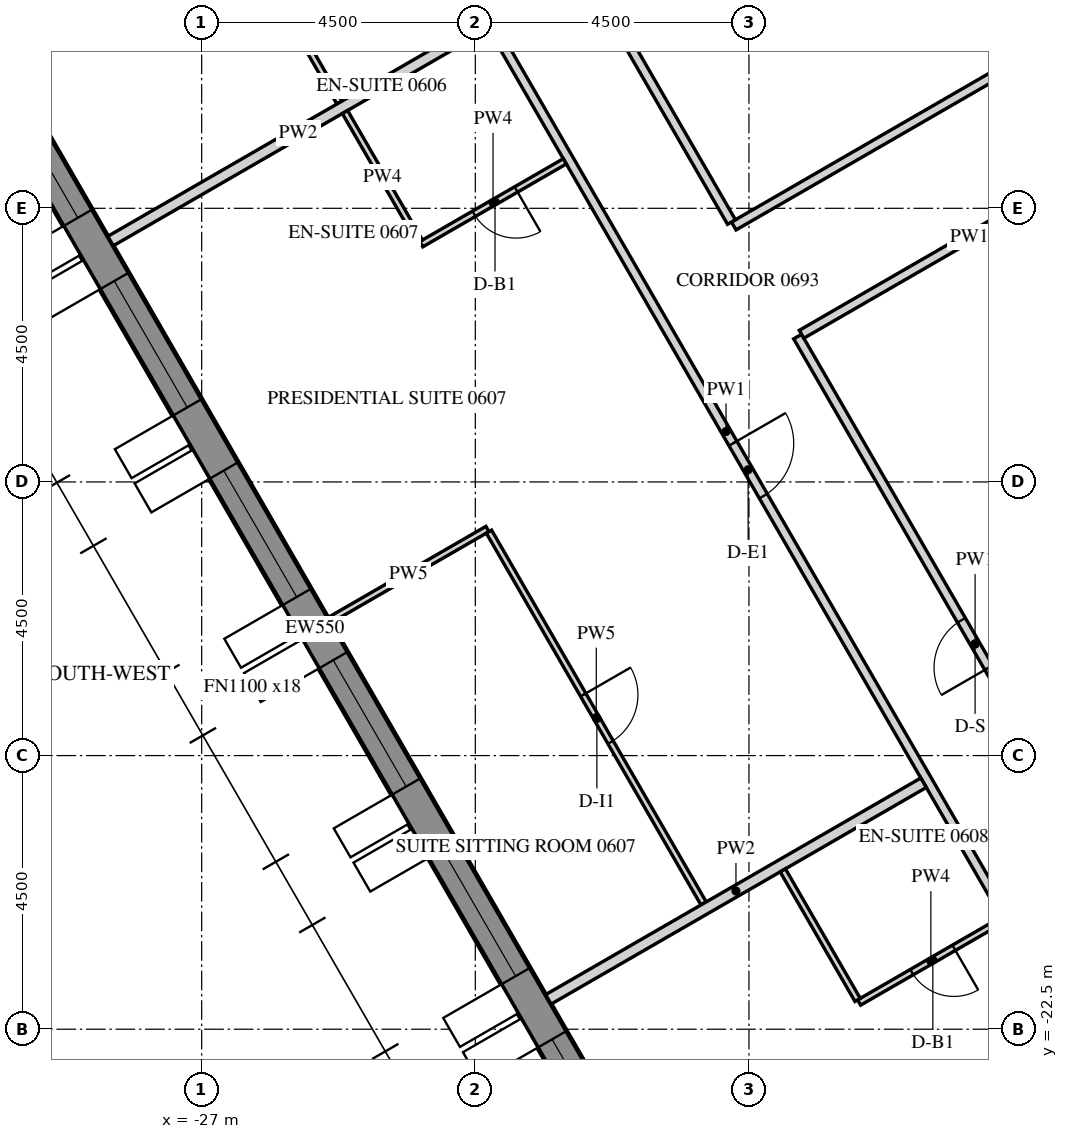
"""IFC4 building model, lengths in metres.
Left out: names, types, materials, properties, quantities, classifications, styles, units other than length and angle.
Written with IfcOpenShell. Run it as: python <this file> out.ifc"""

import sys

from ifc_helpers import new_model, si_unit, direction, frame, frame_2d, origin, place, context, subcontext, project, spatial, polyline, rectangle, outline, extrude, element, fill, save


model = new_model("IFC4")
c1 = context("Model", 3, precision=1e-05, world=origin(), true_north=direction((0.0, 1.0)))
c2 = subcontext(c1, "Body", "Model", "MODEL_VIEW")
j1 = project(units=[si_unit("LENGTHUNIT", "METRE"), si_unit("PLANEANGLEUNIT", "RADIAN")], contexts=[c1])
p1 = place(None, origin())
s1 = spatial("IfcSite", under=j1, at=p1, CompositionType="ELEMENT")
p2 = place(p1, origin())
s2 = spatial("IfcBuilding", under=s1, at=p2, CompositionType="ELEMENT")
p3 = place(p2, frame((0.0, 0.0, 92.1)))
s3 = spatial("IfcBuildingStorey", under=s2, at=p3, CompositionType="ELEMENT", Elevation=92.1)
p4 = place(p3, frame((-32.655, -2.89, -0.15), z_axis=(0.0, 0.0, 1.0), x_axis=(0.499997711317, -0.866026725152, 0.0)))
e1 = element("IfcWall", 1, at=p4, inside=s3, PredefinedType="SOLIDWALL", context=c2, shape_type="SweptSolid", body=[
    extrude(outline(polyline([(-0.022, -0.275), (30.097, -0.275), (30.045, 0.275), (0.022, 0.275), (-0.022, -0.275)])), origin(), (0.0, 0.0, 1.0), 3.9),
])
p5 = place(p4, frame((1.236, 0.0, 1.05)))
e2 = element("IfcOpeningElement", 2, at=p5, cuts=e1, PredefinedType="OPENING", context=c2, shape_type="SweptSolid", body=[
    extrude(rectangle(XDim=2.4, YDim=2.4, at=frame_2d((1.2, 1.2))), frame((0.0, 0.285, 0.0), z_axis=(0.0, -1.0, 0.0), x_axis=(1.0, 0.0, 0.0)), (0.0, 0.0, 1.0), 0.57),
])
p6 = place(p4, frame((4.835, 0.0, 1.05)))
e3 = element("IfcOpeningElement", 3, at=p6, cuts=e1, PredefinedType="OPENING", context=c2, shape_type="SweptSolid", body=[
    extrude(rectangle(XDim=2.4, YDim=2.4, at=frame_2d((1.2, 1.2))), frame((0.0, 0.285, 0.0), z_axis=(0.0, -1.0, 0.0), x_axis=(1.0, 0.0, 0.0)), (0.0, 0.0, 1.0), 0.57),
])
p7 = place(p4, frame((8.436, 0.0, 1.05)))
e4 = element("IfcOpeningElement", 4, at=p7, cuts=e1, PredefinedType="OPENING", context=c2, shape_type="SweptSolid", body=[
    extrude(rectangle(XDim=2.4, YDim=2.4, at=frame_2d((1.2, 1.2))), frame((0.0, 0.285, 0.0), z_axis=(0.0, -1.0, 0.0), x_axis=(1.0, 0.0, 0.0)), (0.0, 0.0, 1.0), 0.57),
])
p8 = place(p4, frame((12.035, 0.0, 1.05)))
e5 = element("IfcOpeningElement", 5, at=p8, cuts=e1, PredefinedType="OPENING", context=c2, shape_type="SweptSolid", body=[
    extrude(rectangle(XDim=2.4, YDim=2.4, at=frame_2d((1.2, 1.2))), frame((0.0, 0.285, 0.0), z_axis=(0.0, -1.0, 0.0), x_axis=(1.0, 0.0, 0.0)), (0.0, 0.0, 1.0), 0.57),
])
p9 = place(p4, frame((15.635, 0.0, 1.05)))
e6 = element("IfcOpeningElement", 6, at=p9, cuts=e1, PredefinedType="OPENING", context=c2, shape_type="SweptSolid", body=[
    extrude(rectangle(XDim=2.4, YDim=2.4, at=frame_2d((1.2, 1.2))), frame((0.0, 0.285, 0.0), z_axis=(0.0, -1.0, 0.0), x_axis=(1.0, 0.0, 0.0)), (0.0, 0.0, 1.0), 0.57),
])
p10 = place(p4, frame((19.236, 0.0, 1.05)))
e7 = element("IfcOpeningElement", 7, at=p10, cuts=e1, PredefinedType="OPENING", context=c2, shape_type="SweptSolid", body=[
    extrude(rectangle(XDim=2.4, YDim=2.4, at=frame_2d((1.2, 1.2))), frame((0.0, 0.285, 0.0), z_axis=(0.0, -1.0, 0.0), x_axis=(1.0, 0.0, 0.0)), (0.0, 0.0, 1.0), 0.57),
])
p11 = place(p4, frame((22.835, 0.0, 1.05)))
e8 = element("IfcOpeningElement", 8, at=p11, cuts=e1, PredefinedType="OPENING", context=c2, shape_type="SweptSolid", body=[
    extrude(rectangle(XDim=2.4, YDim=2.4, at=frame_2d((1.2, 1.2))), frame((0.0, 0.285, 0.0), z_axis=(0.0, -1.0, 0.0), x_axis=(1.0, 0.0, 0.0)), (0.0, 0.0, 1.0), 0.57),
])
p12 = place(p4, frame((26.436, 0.0, 1.05)))
e9 = element("IfcOpeningElement", 9, at=p12, cuts=e1, PredefinedType="OPENING", context=c2, shape_type="SweptSolid", body=[
    extrude(rectangle(XDim=2.4, YDim=2.4, at=frame_2d((1.2, 1.2))), frame((0.0, 0.285, 0.0), z_axis=(0.0, -1.0, 0.0), x_axis=(1.0, 0.0, 0.0)), (0.0, 0.0, 1.0), 0.57),
])
p13 = place(p3, frame((-15.819, 0.0, -0.15), z_axis=(0.0, 0.0, 1.0), x_axis=(0.499999880136, -0.866025472988, 0.0)))
e10 = element("IfcWall", 10, at=p13, inside=s3, PredefinedType="SHEAR", context=c2, shape_type="SweptSolid", body=[
    extrude(outline(polyline([(-0.173, -0.3), (15.993, -0.3), (15.646, 0.3), (0.173, 0.3), (-0.173, -0.3)])), origin(), (0.0, 0.0, 1.0), 3.9),
])
p14 = place(p13, frame((6.981, 0.0, 0.15)))
e11 = element("IfcOpeningElement", 11, at=p14, cuts=e10, PredefinedType="OPENING", context=c2, shape_type="SweptSolid", body=[
    extrude(rectangle(XDim=1.8, YDim=2.4, at=frame_2d((0.9, 1.2))), frame((0.0, 0.31, 0.0), z_axis=(0.0, -1.0, 0.0), x_axis=(1.0, 0.0, 0.0)), (0.0, 0.0, 1.0), 0.62),
])
p15 = place(p3, frame((-24.436, -2.175, 0.0), z_axis=(0.0, 0.0, 1.0), x_axis=(0.499996816197, -0.866027241946, 0.0)))
e12 = element("IfcWall", 12, at=p15, inside=s3, PredefinedType="PARTITIONING", context=c2, shape_type="SweptSolid", body=[
    extrude(rectangle(XDim=24.238, YDim=0.15, at=frame_2d((12.119, 0.0))), origin(), (0.0, 0.0, 1.0), 2.988),
])
p16 = place(p15, frame((0.429, 0.0, 0.0)))
e13 = element("IfcOpeningElement", 13, at=p16, cuts=e12, PredefinedType="OPENING", context=c2, shape_type="SweptSolid", body=[
    extrude(rectangle(XDim=1.0, YDim=2.1, at=frame_2d((0.5, 1.05))), frame((0.0, 0.085, 0.0), z_axis=(0.0, -1.0, 0.0), x_axis=(1.0, 0.0, 0.0)), (0.0, 0.0, 1.0), 0.17),
])
p17 = place(p15, frame((12.346, 0.0, 0.0)))
e14 = element("IfcOpeningElement", 14, at=p17, cuts=e12, PredefinedType="OPENING", context=c2, shape_type="SweptSolid", body=[
    extrude(rectangle(XDim=1.0, YDim=2.1, at=frame_2d((0.5, 1.05))), frame((0.0, 0.085, 0.0), z_axis=(0.0, -1.0, 0.0), x_axis=(1.0, 0.0, 0.0)), (0.0, 0.0, 1.0), 0.17),
])
p18 = place(p15, frame((22.292, 0.0, 0.0)))
e15 = element("IfcOpeningElement", 15, at=p18, cuts=e12, PredefinedType="OPENING", context=c2, shape_type="SweptSolid", body=[
    extrude(rectangle(XDim=1.0, YDim=2.1, at=frame_2d((0.5, 1.05))), frame((0.0, 0.085, 0.0), z_axis=(0.0, -1.0, 0.0), x_axis=(1.0, 0.0, 0.0)), (0.0, 0.0, 1.0), 0.17),
])
p19 = place(p3, frame((-12.664, -6.066, 0.0), z_axis=(0.0, 0.0, 1.0), x_axis=(-0.866021702275, -0.500006411147, 0.0)))
e16 = element("IfcWall", 16, at=p19, inside=s3, PredefinedType="PARTITIONING", context=c2, shape_type="SweptSolid", body=[
    extrude(rectangle(XDim=6.45, YDim=0.15, at=frame_2d((3.225, 0.0))), origin(), (0.0, 0.0, 1.0), 2.988),
])
p20 = place(p3, frame((-18.287, -9.226, 0.0), z_axis=(0.0, 0.0, 1.0), x_axis=(-0.500004853958, 0.866022601332, 0.0)))
e17 = element("IfcWall", 17, at=p20, inside=s3, PredefinedType="PARTITIONING", context=c2, shape_type="SweptSolid", body=[
    extrude(rectangle(XDim=8.531, YDim=0.15, at=frame_2d((4.266, 0.0))), origin(), (0.0, 0.0, 1.0), 2.988),
])
p21 = place(p20, frame((3.816, 0.0, 0.0)))
e18 = element("IfcOpeningElement", 18, at=p21, cuts=e17, PredefinedType="OPENING", context=c2, shape_type="SweptSolid", body=[
    extrude(rectangle(XDim=0.9, YDim=2.1, at=frame_2d((0.45, 1.05))), frame((0.0, 0.085, 0.0), z_axis=(0.0, -1.0, 0.0), x_axis=(1.0, 0.0, 0.0)), (0.0, 0.0, 1.0), 0.17),
])
p22 = place(p3, frame((-11.363, -21.219, 0.0), z_axis=(0.0, 0.0, 1.0), x_axis=(-0.50001451402, 0.866017023949, 0.0)))
e19 = element("IfcWall", 19, at=p22, inside=s3, PredefinedType="PARTITIONING", context=c2, shape_type="SweptSolid", body=[
    extrude(rectangle(XDim=11.674, YDim=0.15, at=frame_2d((5.837, 0.0))), origin(), (0.0, 0.0, 1.0), 2.988),
])
p23 = place(p22, frame((5.387, 0.0, 0.0)))
e20 = element("IfcOpeningElement", 20, at=p23, cuts=e19, PredefinedType="OPENING", context=c2, shape_type="SweptSolid", body=[
    extrude(rectangle(XDim=0.9, YDim=2.1, at=frame_2d((0.45, 1.05))), frame((0.0, 0.085, 0.0), z_axis=(0.0, -1.0, 0.0), x_axis=(1.0, 0.0, 0.0)), (0.0, 0.0, 1.0), 0.17),
])
p24 = place(p3, frame((-17.135, -11.072, 0.0), z_axis=(0.0, 0.0, 1.0), x_axis=(0.866028703517, 0.499994284652, 0.0)))
e21 = element("IfcWall", 21, at=p24, inside=s3, PredefinedType="PARTITIONING", context=c2, shape_type="SweptSolid", body=[
    extrude(rectangle(XDim=6.375, YDim=0.15, at=frame_2d((3.188, 0.0))), origin(), (0.0, 0.0, 1.0), 2.988),
])
p25 = place(p3, frame((-24.733, -7.26, 0.0), z_axis=(0.0, 0.0, 1.0), x_axis=(-0.500015210774, 0.866016621662, 0.0)))
e22 = element("IfcWall", 22, at=p25, inside=s3, PredefinedType="PARTITIONING", context=c2, shape_type="SweptSolid", body=[
    extrude(rectangle(XDim=2.31, YDim=0.1, at=frame_2d((1.155, 0.0))), origin(), (0.0, 0.0, 1.0), 2.988),
])
p26 = place(p3, frame((-28.499, -9.538, 0.0), z_axis=(0.0, 0.0, 1.0), x_axis=(0.866024672353, 0.500001266874, 0.0)))
e23 = element("IfcWall", 23, at=p26, inside=s3, PredefinedType="PARTITIONING", context=c2, shape_type="SweptSolid", body=[
    extrude(rectangle(XDim=7.125, YDim=0.18, at=frame_2d((3.562, 0.0))), origin(), (0.0, 0.0, 1.0), 2.988),
])
p27 = place(p3, frame((-21.029, -8.228, 0.0), z_axis=(0.0, 0.0, 1.0), x_axis=(-0.866012511928, -0.500022328685, 0.0)))
e24 = element("IfcWall", 24, at=p27, inside=s3, PredefinedType="PARTITIONING", context=c2, shape_type="SweptSolid", body=[
    extrude(rectangle(XDim=2.725, YDim=0.1, at=frame_2d((1.363, 0.0))), origin(), (0.0, 0.0, 1.0), 2.988),
])
p28 = place(p27, frame((0.925, 0.0, 0.0)))
e25 = element("IfcOpeningElement", 25, at=p28, cuts=e24, PredefinedType="OPENING", context=c2, shape_type="SweptSolid", body=[
    extrude(rectangle(XDim=0.8, YDim=2.1, at=frame_2d((0.4, 1.05))), frame((0.0, 0.06, 0.0), z_axis=(0.0, -1.0, 0.0), x_axis=(1.0, 0.0, 0.0)), (0.0, 0.0, 1.0), 0.12),
])
p29 = place(p3, frame((-23.413, -9.547, 0.0), z_axis=(0.0, 0.0, 1.0), x_axis=(-0.499960120811, 0.86604842682, 0.0)))
e26 = element("IfcWall", 26, at=p29, inside=s3, PredefinedType="PARTITIONING", context=c2, shape_type="SweptSolid", body=[
    extrude(rectangle(XDim=2.46, YDim=0.1, at=frame_2d((1.23, 0.0))), origin(), (0.0, 0.0, 1.0), 2.988),
])
p30 = place(p3, frame((-24.899, -15.774, 0.0), z_axis=(0.0, 0.0, 1.0), x_axis=(0.866066333729, 0.499929100554, 0.0)))
e27 = element("IfcWall", 27, at=p30, inside=s3, PredefinedType="PARTITIONING", context=c2, shape_type="SweptSolid", body=[
    extrude(rectangle(XDim=3.0, YDim=0.1, at=frame_2d((1.5, 0.0))), origin(), (0.0, 0.0, 1.0), 2.988),
])
p31 = place(p3, frame((-22.276, -14.317, 0.0), z_axis=(0.0, 0.0, 1.0), x_axis=(0.500010820671, -0.866019156377, 0.0)))
e28 = element("IfcWall", 28, at=p31, inside=s3, PredefinedType="PARTITIONING", context=c2, shape_type="SweptSolid", body=[
    extrude(rectangle(XDim=7.06, YDim=0.1, at=frame_2d((3.53, 0.0))), origin(), (0.0, 0.0, 1.0), 2.988),
])
p32 = place(p31, frame((3.1, 0.0, 0.0)))
e29 = element("IfcOpeningElement", 29, at=p32, cuts=e28, PredefinedType="OPENING", context=c2, shape_type="SweptSolid", body=[
    extrude(rectangle(XDim=0.9, YDim=2.1, at=frame_2d((0.45, 1.05))), frame((0.0, 0.06, 0.0), z_axis=(0.0, -1.0, 0.0), x_axis=(1.0, 0.0, 0.0)), (0.0, 0.0, 1.0), 0.12),
])
p33 = place(p3, frame((-21.299, -22.009, 0.0), z_axis=(0.0, 0.0, 1.0), x_axis=(0.866024672353, 0.500001266874, 0.0)))
e30 = element("IfcWall", 30, at=p33, inside=s3, PredefinedType="PARTITIONING", context=c2, shape_type="SweptSolid", body=[
    extrude(rectangle(XDim=7.125, YDim=0.18, at=frame_2d((3.562, 0.0))), origin(), (0.0, 0.0, 1.0), 2.988),
])
p34 = place(p3, frame((-13.829, -20.698, 0.0), z_axis=(0.0, 0.0, 1.0), x_axis=(-0.866012511928, -0.500022328685, 0.0)))
e31 = element("IfcWall", 31, at=p34, inside=s3, PredefinedType="PARTITIONING", context=c2, shape_type="SweptSolid", body=[
    extrude(rectangle(XDim=2.725, YDim=0.1, at=frame_2d((1.363, 0.0))), origin(), (0.0, 0.0, 1.0), 2.988),
])
p35 = place(p34, frame((0.925, 0.0, 0.0)))
e32 = element("IfcOpeningElement", 32, at=p35, cuts=e31, PredefinedType="OPENING", context=c2, shape_type="SweptSolid", body=[
    extrude(rectangle(XDim=0.8, YDim=2.1, at=frame_2d((0.4, 1.05))), frame((0.0, 0.06, 0.0), z_axis=(0.0, -1.0, 0.0), x_axis=(1.0, 0.0, 0.0)), (0.0, 0.0, 1.0), 0.12),
])
p36 = place(p3, frame((-16.213, -22.018, 0.0), z_axis=(0.0, 0.0, 1.0), x_axis=(-0.500003092839, 0.866023618125, 0.0)))
e33 = element("IfcWall", 33, at=p36, inside=s3, PredefinedType="PARTITIONING", context=c2, shape_type="SweptSolid", body=[
    extrude(rectangle(XDim=2.46, YDim=0.1, at=frame_2d((1.23, 0.0))), origin(), (0.0, 0.0, 1.0), 2.988),
])
p37 = place(p6, frame((0.0, 0.205, 0.0)))
e34 = element("IfcWindow", 34, at=p37, inside=s3, PartitioningType="DOUBLE_PANEL_VERTICAL", PredefinedType="WINDOW", context=c2, shape_type="SweptSolid", body=[
    extrude(rectangle(XDim=2.4, YDim=2.4, at=frame_2d((1.2, 1.2))), frame((0.0, 0.03, 0.0), z_axis=(0.0, -1.0, 0.0), x_axis=(1.0, 0.0, 0.0)), (0.0, 0.0, 1.0), 0.06),
])
fill(e3, e34)
p38 = place(p7, frame((0.0, 0.205, 0.0)))
e35 = element("IfcWindow", 35, at=p38, inside=s3, PartitioningType="DOUBLE_PANEL_VERTICAL", PredefinedType="WINDOW", context=c2, shape_type="SweptSolid", body=[
    extrude(rectangle(XDim=2.4, YDim=2.4, at=frame_2d((1.2, 1.2))), frame((0.0, 0.03, 0.0), z_axis=(0.0, -1.0, 0.0), x_axis=(1.0, 0.0, 0.0)), (0.0, 0.0, 1.0), 0.06),
])
fill(e4, e35)
p39 = place(p8, frame((0.0, 0.205, 0.0)))
e36 = element("IfcWindow", 36, at=p39, inside=s3, PartitioningType="DOUBLE_PANEL_VERTICAL", PredefinedType="WINDOW", context=c2, shape_type="SweptSolid", body=[
    extrude(rectangle(XDim=2.4, YDim=2.4, at=frame_2d((1.2, 1.2))), frame((0.0, 0.03, 0.0), z_axis=(0.0, -1.0, 0.0), x_axis=(1.0, 0.0, 0.0)), (0.0, 0.0, 1.0), 0.06),
])
fill(e5, e36)
p40 = place(p9, frame((0.0, 0.205, 0.0)))
e37 = element("IfcWindow", 37, at=p40, inside=s3, PartitioningType="DOUBLE_PANEL_VERTICAL", PredefinedType="WINDOW", context=c2, shape_type="SweptSolid", body=[
    extrude(rectangle(XDim=2.4, YDim=2.4, at=frame_2d((1.2, 1.2))), frame((0.0, 0.03, 0.0), z_axis=(0.0, -1.0, 0.0), x_axis=(1.0, 0.0, 0.0)), (0.0, 0.0, 1.0), 0.06),
])
fill(e6, e37)
p41 = place(p10, frame((0.0, 0.205, 0.0)))
e38 = element("IfcWindow", 38, at=p41, inside=s3, PartitioningType="DOUBLE_PANEL_VERTICAL", PredefinedType="WINDOW", context=c2, shape_type="SweptSolid", body=[
    extrude(rectangle(XDim=2.4, YDim=2.4, at=frame_2d((1.2, 1.2))), frame((0.0, 0.03, 0.0), z_axis=(0.0, -1.0, 0.0), x_axis=(1.0, 0.0, 0.0)), (0.0, 0.0, 1.0), 0.06),
])
fill(e7, e38)
p42 = place(p11, frame((0.0, 0.205, 0.0)))
e39 = element("IfcWindow", 39, at=p42, inside=s3, PartitioningType="DOUBLE_PANEL_VERTICAL", PredefinedType="WINDOW", context=c2, shape_type="SweptSolid", body=[
    extrude(rectangle(XDim=2.4, YDim=2.4, at=frame_2d((1.2, 1.2))), frame((0.0, 0.03, 0.0), z_axis=(0.0, -1.0, 0.0), x_axis=(1.0, 0.0, 0.0)), (0.0, 0.0, 1.0), 0.06),
])
fill(e8, e39)
p43 = place(p17, origin())
e40 = element("IfcDoor", 40, at=p43, inside=s3, OperationType="SINGLE_SWING_RIGHT", PredefinedType="DOOR", context=c2, shape_type="SweptSolid", body=[
    extrude(rectangle(XDim=1.0, YDim=2.1, at=frame_2d((0.5, 1.05))), frame((0.0, 0.025, 0.0), z_axis=(0.0, -1.0, 0.0), x_axis=(1.0, 0.0, 0.0)), (0.0, 0.0, 1.0), 0.05),
])
fill(e14, e40)
p44 = place(p28, origin())
e41 = element("IfcDoor", 41, at=p44, inside=s3, OperationType="SINGLE_SWING_RIGHT", PredefinedType="DOOR", context=c2, shape_type="SweptSolid", body=[
    extrude(rectangle(XDim=0.8, YDim=2.1, at=frame_2d((0.4, 1.05))), frame((0.0, 0.025, 0.0), z_axis=(0.0, -1.0, 0.0), x_axis=(1.0, 0.0, 0.0)), (0.0, 0.0, 1.0), 0.05),
])
fill(e25, e41)
p45 = place(p32, origin())
e42 = element("IfcDoor", 42, at=p45, inside=s3, OperationType="SINGLE_SWING_LEFT", PredefinedType="DOOR", context=c2, shape_type="SweptSolid", body=[
    extrude(rectangle(XDim=0.9, YDim=2.1, at=frame_2d((0.45, 1.05))), frame((0.0, 0.025, 0.0), z_axis=(0.0, -1.0, 0.0), x_axis=(1.0, 0.0, 0.0)), (0.0, 0.0, 1.0), 0.05),
])
fill(e29, e42)
p46 = place(p35, origin())
e43 = element("IfcDoor", 43, at=p46, inside=s3, OperationType="SINGLE_SWING_RIGHT", PredefinedType="DOOR", context=c2, shape_type="SweptSolid", body=[
    extrude(rectangle(XDim=0.8, YDim=2.1, at=frame_2d((0.4, 1.05))), frame((0.0, 0.025, 0.0), z_axis=(0.0, -1.0, 0.0), x_axis=(1.0, 0.0, 0.0)), (0.0, 0.0, 1.0), 0.05),
])
fill(e32, e43)
p47 = place(p23, origin())
e44 = element("IfcDoor", 44, at=p47, inside=s3, OperationType="SINGLE_SWING_RIGHT", PredefinedType="DOOR", context=c2, shape_type="SweptSolid", body=[
    extrude(rectangle(XDim=0.9, YDim=2.1, at=frame_2d((0.45, 1.05))), frame((0.0, 0.025, 0.0), z_axis=(0.0, -1.0, 0.0), x_axis=(1.0, 0.0, 0.0)), (0.0, 0.0, 1.0), 0.05),
])
fill(e20, e44)
save(model, sys.argv[1])
